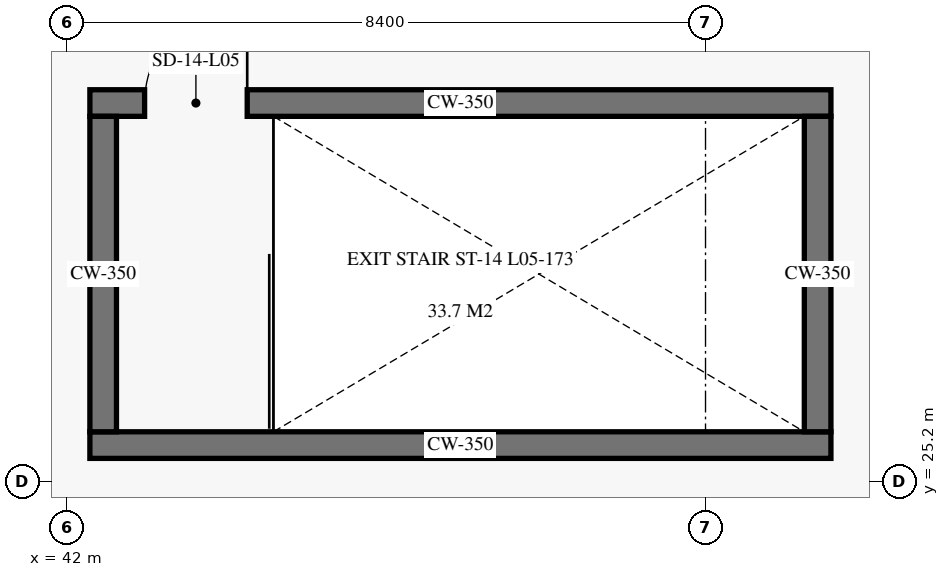
"""IFC4 building model, lengths in metres.
Left out: names, types, materials, properties, quantities, classifications, styles, units other than length and angle.
Written with IfcOpenShell. Run it as: python <this file> out.ifc"""

import sys

from ifc_helpers import new_model, si_unit, direction, frame, frame_2d, origin, place, context, subcontext, project, spatial, rectangle, extrude, element, fill, save


model = new_model("IFC4")
c1 = context("Model", 3, precision=1e-05, world=origin(), true_north=direction((0.0, 1.0)))
c2 = subcontext(c1, "Body", "Model", "MODEL_VIEW")
j1 = project(units=[si_unit("LENGTHUNIT", "METRE"), si_unit("PLANEANGLEUNIT", "RADIAN")], contexts=[c1])
p1 = place(None, origin())
s1 = spatial("IfcSite", under=j1, at=p1, CompositionType="ELEMENT")
p2 = place(p1, origin())
s2 = spatial("IfcBuilding", under=s1, at=p2, CompositionType="ELEMENT")
p3 = place(p2, frame((0.0, 0.0, 22.2)))
s3 = spatial("IfcBuildingStorey", under=s2, at=p3, CompositionType="ELEMENT", Elevation=22.2)
p4 = place(p3, frame((42.3, 25.675, 0.0), z_axis=(0.0, 0.0, 1.0), x_axis=(1.0, 0.0, 0.0)))
e1 = element("IfcWall", 1, at=p4, inside=s3, PredefinedType="SHEAR", context=c2, shape_type="SweptSolid", body=[
    extrude(rectangle(XDim=9.75, YDim=0.35, at=frame_2d((4.875, 0.0))), origin(), (0.0, 0.0, 1.0), 4.22),
])
p5 = place(p3, frame((42.3, 30.175, 0.0), z_axis=(0.0, 0.0, 1.0), x_axis=(1.0, 0.0, 0.0)))
e2 = element("IfcWall", 2, at=p5, inside=s3, PredefinedType="SHEAR", context=c2, shape_type="SweptSolid", body=[
    extrude(rectangle(XDim=9.75, YDim=0.35, at=frame_2d((4.875, 0.0))), origin(), (0.0, 0.0, 1.0), 4.22),
])
p6 = place(p5, frame((0.72, 0.0, 0.0)))
e3 = element("IfcOpeningElement", 3, at=p6, cuts=e2, PredefinedType="OPENING", context=c2, shape_type="SweptSolid", body=[
    extrude(rectangle(XDim=1.35, YDim=2.25, at=frame_2d((0.675, 1.125))), frame((0.0, 0.185, 0.0), z_axis=(0.0, -1.0, 0.0), x_axis=(1.0, 0.0, 0.0)), (0.0, 0.0, 1.0), 0.37),
])
for number, where, z_axis, x_axis in (
    (4, (42.475, 25.85, 0.0), (0.0, 0.0, 1.0), (0.0, 1.0, 0.0)),
    (5, (51.875, 25.85, 0.0), (0.0, 0.0, 1.0), (0.0, 1.0, 0.0)),
):
    element("IfcWall", number, at=place(p3, frame(where, z_axis=z_axis, x_axis=x_axis)), inside=s3, PredefinedType="SHEAR", context=c2, shape_type="SweptSolid", body=[
        extrude(rectangle(XDim=4.15, YDim=0.35, at=frame_2d((2.075, 0.0))), origin(), (0.0, 0.0, 1.0), 4.22),
    ])
p7 = place(p6, origin())
e6 = element("IfcDoor", 6, at=p7, inside=s3, OperationType="SINGLE_SWING_RIGHT", PredefinedType="DOOR", context=c2, shape_type="SweptSolid", body=[
    extrude(rectangle(XDim=1.35, YDim=2.25, at=frame_2d((0.675, 1.125))), frame((0.0, 0.025, 0.0), z_axis=(0.0, -1.0, 0.0), x_axis=(1.0, 0.0, 0.0)), (0.0, 0.0, 1.0), 0.05),
])
fill(e3, e6)
save(model, sys.argv[1])
